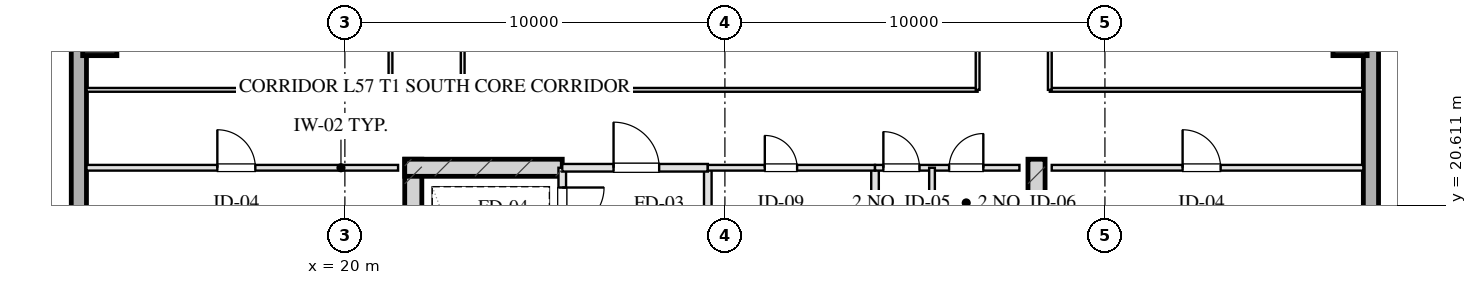
"""IFC4 building model, lengths in metres.
Left out: names, types, materials, properties, quantities, classifications, styles, units other than length and angle.
Written with IfcOpenShell. Run it as: python <this file> out.ifc"""

import sys

from ifc_helpers import new_model, si_unit, direction, frame, frame_2d, origin, origin_2d, place, context, subcontext, project, spatial, rectangle, hollow_rectangle, extrude, element, fill, save


model = new_model("IFC4")
c1 = context("Model", 3, precision=1e-05, world=origin(), true_north=direction((0.0, 1.0)))
c2 = subcontext(c1, "Body", "Model", "MODEL_VIEW")
j1 = project(units=[si_unit("LENGTHUNIT", "METRE"), si_unit("PLANEANGLEUNIT", "RADIAN")], contexts=[c1])
p1 = place(None, origin())
s1 = spatial("IfcSite", under=j1, at=p1, CompositionType="ELEMENT")
p2 = place(p1, origin())
s2 = spatial("IfcBuilding", under=s1, at=p2, CompositionType="ELEMENT")
p3 = place(p2, frame((0.0, 0.0, 212.75)))
s3 = spatial("IfcBuildingStorey", under=s2, at=p3, CompositionType="ELEMENT", Elevation=212.75)
for number, where, z_axis, x_axis in (
    (1, (21.8, 21.825, 0.0), (0.0, 0.0, 1.0), (0.0, -1.0, 0.0)),
    (2, (38.2, 21.825, 0.0), (0.0, 0.0, 1.0), (0.0, -1.0, 0.0)),
):
    element("IfcWall", number, at=place(p3, frame(where, z_axis=z_axis, x_axis=x_axis)), inside=s3, PredefinedType="SHEAR", context=c2, shape_type="SweptSolid", body=[
        extrude(rectangle(XDim=9.33, YDim=0.45, at=frame_2d((4.665, 0.0))), origin(), (0.0, 0.0, 1.0), 3.45),
    ])
p4 = place(p3, frame((21.575, 21.6, 0.0), z_axis=(0.0, 0.0, 1.0), x_axis=(1.0, 0.0, 0.0)))
e3 = element("IfcWall", 3, at=p4, inside=s3, PredefinedType="SHEAR", context=c2, shape_type="SweptSolid", body=[
    extrude(rectangle(XDim=4.145, YDim=0.45, at=frame_2d((2.073, 0.0))), origin(), (0.0, 0.0, 1.0), 3.45),
])
for number, where, z_axis, x_axis in (
    (4, (13.55, 25.0, 0.0), (0.0, 0.0, 1.0), (1.0, 0.0, 0.0)),
    (5, (46.45, 25.0, 0.0), (0.0, 0.0, 1.0), (1.0, 0.0, 0.0)),
):
    element("IfcColumn", number, at=place(p3, frame(where, z_axis=z_axis, x_axis=x_axis)), inside=s3, PredefinedType="COLUMN", context=c2, shape_type="SweptSolid", body=[
        extrude(hollow_rectangle(XDim=0.9, YDim=0.9, WallThickness=0.032, at=origin_2d()), origin(), (0.0, 0.0, 1.0), 3.451),
    ])
p5 = place(p3, frame((13.0, 10.8, 0.0), z_axis=(0.0, 0.0, 1.0), x_axis=(0.0, 1.0, 0.0)))
e6 = element("IfcWall", 6, at=p5, inside=s3, PredefinedType="SOLIDWALL", context=c2, shape_type="SweptSolid", body=[
    extrude(rectangle(XDim=46.4, YDim=0.4, at=frame_2d((23.2, 0.0))), origin(), (0.0, 0.0, 1.0), 2.55),
])
p6 = place(p5, frame((15.75, 0.0, 0.75)))
e7 = element("IfcOpeningElement", 7, at=p6, cuts=e6, PredefinedType="OPENING", context=c2, shape_type="SweptSolid", body=[
    extrude(rectangle(XDim=2.1, YDim=1.4, at=frame_2d((1.05, 0.7))), frame((0.0, 0.21, 0.0), z_axis=(0.0, -1.0, 0.0), x_axis=(1.0, 0.0, 0.0)), (0.0, 0.0, 1.0), 0.42),
])
p7 = place(p5, frame((19.55, 0.0, 0.75)))
e8 = element("IfcOpeningElement", 8, at=p7, cuts=e6, PredefinedType="OPENING", context=c2, shape_type="SweptSolid", body=[
    extrude(rectangle(XDim=2.1, YDim=1.4, at=frame_2d((1.05, 0.7))), frame((0.0, 0.21, 0.0), z_axis=(0.0, -1.0, 0.0), x_axis=(1.0, 0.0, 0.0)), (0.0, 0.0, 1.0), 0.42),
])
p8 = place(p5, frame((24.75, 0.0, 0.75)))
e9 = element("IfcOpeningElement", 9, at=p8, cuts=e6, PredefinedType="OPENING", context=c2, shape_type="SweptSolid", body=[
    extrude(rectangle(XDim=2.1, YDim=1.4, at=frame_2d((1.05, 0.7))), frame((0.0, 0.21, 0.0), z_axis=(0.0, -1.0, 0.0), x_axis=(1.0, 0.0, 0.0)), (0.0, 0.0, 1.0), 0.42),
])
p9 = place(p5, frame((28.55, 0.0, 0.75)))
e10 = element("IfcOpeningElement", 10, at=p9, cuts=e6, PredefinedType="OPENING", context=c2, shape_type="SweptSolid", body=[
    extrude(rectangle(XDim=2.1, YDim=1.4, at=frame_2d((1.05, 0.7))), frame((0.0, 0.21, 0.0), z_axis=(0.0, -1.0, 0.0), x_axis=(1.0, 0.0, 0.0)), (0.0, 0.0, 1.0), 0.42),
])
p10 = place(p3, frame((47.0, 57.2, 0.0), z_axis=(0.0, 0.0, 1.0), x_axis=(0.0, -1.0, 0.0)))
e11 = element("IfcWall", 11, at=p10, inside=s3, PredefinedType="SOLIDWALL", context=c2, shape_type="SweptSolid", body=[
    extrude(rectangle(XDim=46.4, YDim=0.4, at=frame_2d((23.2, 0.0))), origin(), (0.0, 0.0, 1.0), 2.55),
])
p11 = place(p10, frame((28.55, 0.0, 0.75)))
e12 = element("IfcOpeningElement", 12, at=p11, cuts=e11, PredefinedType="OPENING", context=c2, shape_type="SweptSolid", body=[
    extrude(rectangle(XDim=2.1, YDim=1.4, at=frame_2d((1.05, 0.7))), frame((0.0, 0.21, 0.0), z_axis=(0.0, -1.0, 0.0), x_axis=(1.0, 0.0, 0.0)), (0.0, 0.0, 1.0), 0.42),
])
p12 = place(p10, frame((24.75, 0.0, 0.75)))
e13 = element("IfcOpeningElement", 13, at=p12, cuts=e11, PredefinedType="OPENING", context=c2, shape_type="SweptSolid", body=[
    extrude(rectangle(XDim=2.1, YDim=1.4, at=frame_2d((1.05, 0.7))), frame((0.0, 0.21, 0.0), z_axis=(0.0, -1.0, 0.0), x_axis=(1.0, 0.0, 0.0)), (0.0, 0.0, 1.0), 0.42),
])
p13 = place(p10, frame((19.55, 0.0, 0.75)))
e14 = element("IfcOpeningElement", 14, at=p13, cuts=e11, PredefinedType="OPENING", context=c2, shape_type="SweptSolid", body=[
    extrude(rectangle(XDim=2.1, YDim=1.4, at=frame_2d((1.05, 0.7))), frame((0.0, 0.21, 0.0), z_axis=(0.0, -1.0, 0.0), x_axis=(1.0, 0.0, 0.0)), (0.0, 0.0, 1.0), 0.42),
])
p14 = place(p10, frame((15.75, 0.0, 0.75)))
e15 = element("IfcOpeningElement", 15, at=p14, cuts=e11, PredefinedType="OPENING", context=c2, shape_type="SweptSolid", body=[
    extrude(rectangle(XDim=2.1, YDim=1.4, at=frame_2d((1.05, 0.7))), frame((0.0, 0.21, 0.0), z_axis=(0.0, -1.0, 0.0), x_axis=(1.0, 0.0, 0.0)), (0.0, 0.0, 1.0), 0.42),
])
p15 = place(p3, frame((25.72, 21.6, 0.0), z_axis=(0.0, 0.0, 1.0), x_axis=(0.0, -1.0, 0.0)))
e16 = element("IfcWall", 16, at=p15, inside=s3, PredefinedType="PARTITIONING", context=c2, shape_type="SweptSolid", body=[
    extrude(rectangle(XDim=1.9, YDim=0.2, at=frame_2d((0.95, 0.0))), origin(), (0.0, 0.0, 1.0), 3.155),
])
p16 = place(p15, frame((0.52, 0.0, 0.0)))
e17 = element("IfcOpeningElement", 17, at=p16, cuts=e16, PredefinedType="OPENING", context=c2, shape_type="SweptSolid", body=[
    extrude(rectangle(XDim=1.1, YDim=2.05, at=frame_2d((0.55, 1.025))), frame((0.0, 0.11, 0.0), z_axis=(0.0, -1.0, 0.0), x_axis=(1.0, 0.0, 0.0)), (0.0, 0.0, 1.0), 0.22),
])
p17 = place(p3, frame((29.55, 21.6, 0.0), z_axis=(0.0, 0.0, 1.0), x_axis=(0.0, -1.0, 0.0)))
e18 = element("IfcWall", 18, at=p17, inside=s3, PredefinedType="PARTITIONING", context=c2, shape_type="SweptSolid", body=[
    extrude(rectangle(XDim=8.43, YDim=0.2, at=frame_2d((4.215, 0.0))), origin(), (0.0, 0.0, 1.0), 3.155),
])
p18 = place(p3, frame((25.72, 21.6, 0.0), z_axis=(0.0, 0.0, 1.0), x_axis=(1.0, 0.0, 0.0)))
e19 = element("IfcWall", 19, at=p18, inside=s3, PredefinedType="PARTITIONING", context=c2, shape_type="SweptSolid", body=[
    extrude(rectangle(XDim=3.83, YDim=0.2, at=frame_2d((1.915, 0.0))), origin(), (0.0, 0.0, 1.0), 3.155),
])
p19 = place(p18, frame((1.35, 0.0, 0.0)))
e20 = element("IfcOpeningElement", 20, at=p19, cuts=e19, PredefinedType="OPENING", context=c2, shape_type="SweptSolid", body=[
    extrude(rectangle(XDim=1.2, YDim=2.05, at=frame_2d((0.6, 1.025))), frame((0.0, 0.11, 0.0), z_axis=(0.0, -1.0, 0.0), x_axis=(1.0, 0.0, 0.0)), (0.0, 0.0, 1.0), 0.22),
])
p20 = place(p3, frame((33.95, 21.6, 0.0), z_axis=(0.0, 0.0, 1.0), x_axis=(0.0, -1.0, 0.0)))
e21 = element("IfcWall", 21, at=p20, inside=s3, PredefinedType="PARTITIONING", context=c2, shape_type="SweptSolid", body=[
    extrude(rectangle(XDim=8.43, YDim=0.2, at=frame_2d((4.215, 0.0))), origin(), (0.0, 0.0, 1.0), 3.155),
])
p21 = place(p3, frame((29.55, 21.6, 0.0), z_axis=(0.0, 0.0, 1.0), x_axis=(1.0, 0.0, 0.0)))
e22 = element("IfcWall", 22, at=p21, inside=s3, PredefinedType="PARTITIONING", context=c2, shape_type="SweptSolid", body=[
    extrude(rectangle(XDim=4.4, YDim=0.15, at=frame_2d((2.2, 0.0))), origin(), (0.0, 0.0, 1.0), 3.155),
])
p22 = place(p21, frame((1.5, 0.0, 0.0)))
e23 = element("IfcOpeningElement", 23, at=p22, cuts=e22, PredefinedType="OPENING", context=c2, shape_type="SweptSolid", body=[
    extrude(rectangle(XDim=0.85, YDim=2.05, at=frame_2d((0.425, 1.025))), frame((0.0, 0.085, 0.0), z_axis=(0.0, -1.0, 0.0), x_axis=(1.0, 0.0, 0.0)), (0.0, 0.0, 1.0), 0.17),
])
p23 = place(p3, frame((33.95, 21.6, 0.0), z_axis=(0.0, 0.0, 1.0), x_axis=(1.0, 0.0, 0.0)))
e24 = element("IfcWall", 24, at=p23, inside=s3, PredefinedType="PARTITIONING", context=c2, shape_type="SweptSolid", body=[
    extrude(rectangle(XDim=3.8, YDim=0.15, at=frame_2d((1.9, 0.0))), origin(), (0.0, 0.0, 1.0), 3.155),
])
p24 = place(p23, frame((0.22, 0.0, 0.0)))
e25 = element("IfcOpeningElement", 25, at=p24, cuts=e24, PredefinedType="OPENING", context=c2, shape_type="SweptSolid", body=[
    extrude(rectangle(XDim=0.95, YDim=2.05, at=frame_2d((0.475, 1.025))), frame((0.0, 0.085, 0.0), z_axis=(0.0, -1.0, 0.0), x_axis=(1.0, 0.0, 0.0)), (0.0, 0.0, 1.0), 0.17),
])
p25 = place(p23, frame((1.95, 0.0, 0.0)))
e26 = element("IfcOpeningElement", 26, at=p25, cuts=e24, PredefinedType="OPENING", context=c2, shape_type="SweptSolid", body=[
    extrude(rectangle(XDim=0.9, YDim=2.05, at=frame_2d((0.45, 1.025))), frame((0.0, 0.085, 0.0), z_axis=(0.0, -1.0, 0.0), x_axis=(1.0, 0.0, 0.0)), (0.0, 0.0, 1.0), 0.17),
])
p26 = place(p3, frame((35.45, 21.6, 0.0), z_axis=(0.0, 0.0, 1.0), x_axis=(0.0, -1.0, 0.0)))
e27 = element("IfcWall", 27, at=p26, inside=s3, PredefinedType="PARTITIONING", context=c2, shape_type="SweptSolid", body=[
    extrude(rectangle(XDim=8.43, YDim=0.15, at=frame_2d((4.215, 0.0))), origin(), (0.0, 0.0, 1.0), 2.795),
])
p27 = place(p26, frame((2.55, 0.0, 0.0)))
e28 = element("IfcOpeningElement", 28, at=p27, cuts=e27, PredefinedType="OPENING", context=c2, shape_type="SweptSolid", body=[
    extrude(rectangle(XDim=0.95, YDim=2.05, at=frame_2d((0.475, 1.025))), frame((0.0, 0.085, 0.0), z_axis=(0.0, -1.0, 0.0), x_axis=(1.0, 0.0, 0.0)), (0.0, 0.0, 1.0), 0.17),
])
p28 = place(p26, frame((5.6, 0.0, 0.0)))
e29 = element("IfcOpeningElement", 29, at=p28, cuts=e27, PredefinedType="OPENING", context=c2, shape_type="SweptSolid", body=[
    extrude(rectangle(XDim=0.9, YDim=2.05, at=frame_2d((0.45, 1.025))), frame((0.0, 0.085, 0.0), z_axis=(0.0, -1.0, 0.0), x_axis=(1.0, 0.0, 0.0)), (0.0, 0.0, 1.0), 0.17),
])
p29 = place(p3, frame((13.2, 21.6, 0.0), z_axis=(0.0, 0.0, 1.0), x_axis=(1.0, 0.0, 0.0)))
e30 = element("IfcWall", 30, at=p29, inside=s3, PredefinedType="PARTITIONING", context=c2, shape_type="SweptSolid", body=[
    extrude(rectangle(XDim=8.2, YDim=0.15, at=frame_2d((4.1, 0.0))), origin(), (0.0, 0.0, 1.0), 3.155),
])
p30 = place(p29, frame((3.444, 0.0, 0.0)))
e31 = element("IfcOpeningElement", 31, at=p30, cuts=e30, PredefinedType="OPENING", context=c2, shape_type="SweptSolid", body=[
    extrude(rectangle(XDim=1.0, YDim=2.05, at=frame_2d((0.5, 1.025))), frame((0.0, 0.085, 0.0), z_axis=(0.0, -1.0, 0.0), x_axis=(1.0, 0.0, 0.0)), (0.0, 0.0, 1.0), 0.17),
])
p31 = place(p3, frame((38.6, 21.6, 0.0), z_axis=(0.0, 0.0, 1.0), x_axis=(1.0, 0.0, 0.0)))
e32 = element("IfcWall", 32, at=p31, inside=s3, PredefinedType="PARTITIONING", context=c2, shape_type="SweptSolid", body=[
    extrude(rectangle(XDim=8.2, YDim=0.15, at=frame_2d((4.1, 0.0))), origin(), (0.0, 0.0, 1.0), 3.155),
])
p32 = place(p31, frame((3.444, 0.0, 0.0)))
e33 = element("IfcOpeningElement", 33, at=p32, cuts=e32, PredefinedType="OPENING", context=c2, shape_type="SweptSolid", body=[
    extrude(rectangle(XDim=1.0, YDim=2.05, at=frame_2d((0.5, 1.025))), frame((0.0, 0.085, 0.0), z_axis=(0.0, -1.0, 0.0), x_axis=(1.0, 0.0, 0.0)), (0.0, 0.0, 1.0), 0.17),
])
p33 = place(p3, frame((13.2, 23.65, 0.0), z_axis=(0.0, 0.0, 1.0), x_axis=(1.0, 0.0, 0.0)))
e34 = element("IfcWall", 34, at=p33, inside=s3, PredefinedType="MOVABLE", context=c2, shape_type="SweptSolid", body=[
    extrude(rectangle(XDim=8.0, YDim=0.1, at=frame_2d((4.0, 0.0))), origin(), (0.0, 0.0, 1.0), 3.155),
])
p34 = place(p3, frame((23.1, 23.65, 0.0), z_axis=(0.0, 0.0, 1.0), x_axis=(1.0, 0.0, 0.0)))
e35 = element("IfcWall", 35, at=p34, inside=s3, PredefinedType="MOVABLE", context=c2, shape_type="SweptSolid", body=[
    extrude(rectangle(XDim=13.55, YDim=0.1, at=frame_2d((6.775, 0.0))), origin(), (0.0, 0.0, 1.0), 3.155),
])
p35 = place(p3, frame((38.55, 23.65, 0.0), z_axis=(0.0, 0.0, 1.0), x_axis=(1.0, 0.0, 0.0)))
e36 = element("IfcWall", 36, at=p35, inside=s3, PredefinedType="MOVABLE", context=c2, shape_type="SweptSolid", body=[
    extrude(rectangle(XDim=8.25, YDim=0.1, at=frame_2d((4.125, 0.0))), origin(), (0.0, 0.0, 1.0), 3.155),
])
p36 = place(p3, frame((21.2, 23.65, 0.0), z_axis=(0.0, 0.0, 1.0), x_axis=(0.0, 1.0, 0.0)))
e37 = element("IfcWall", 37, at=p36, inside=s3, PredefinedType="MOVABLE", context=c2, shape_type="SweptSolid", body=[
    extrude(rectangle(XDim=20.7, YDim=0.1, at=frame_2d((10.35, 0.0))), origin(), (0.0, 0.0, 1.0), 3.155),
])
p37 = place(p36, frame((2.175, 0.0, 0.0)))
e38 = element("IfcOpeningElement", 38, at=p37, cuts=e37, PredefinedType="OPENING", context=c2, shape_type="SweptSolid", body=[
    extrude(rectangle(XDim=1.0, YDim=2.05, at=frame_2d((0.5, 1.025))), frame((0.0, 0.06, 0.0), z_axis=(0.0, -1.0, 0.0), x_axis=(1.0, 0.0, 0.0)), (0.0, 0.0, 1.0), 0.12),
])
p38 = place(p36, frame((6.75, 0.0, 0.0)))
e39 = element("IfcOpeningElement", 39, at=p38, cuts=e37, PredefinedType="OPENING", context=c2, shape_type="SweptSolid", body=[
    extrude(rectangle(XDim=1.0, YDim=2.05, at=frame_2d((0.5, 1.025))), frame((0.0, 0.06, 0.0), z_axis=(0.0, -1.0, 0.0), x_axis=(1.0, 0.0, 0.0)), (0.0, 0.0, 1.0), 0.12),
])
p39 = place(p36, frame((9.85, 0.0, 0.0)))
e40 = element("IfcOpeningElement", 40, at=p39, cuts=e37, PredefinedType="OPENING", context=c2, shape_type="SweptSolid", body=[
    extrude(rectangle(XDim=1.05, YDim=2.05, at=frame_2d((0.525, 1.025))), frame((0.0, 0.06, 0.0), z_axis=(0.0, -1.0, 0.0), x_axis=(1.0, 0.0, 0.0)), (0.0, 0.0, 1.0), 0.12),
])
p40 = place(p36, frame((12.95, 0.0, 0.0)))
e41 = element("IfcOpeningElement", 41, at=p40, cuts=e37, PredefinedType="OPENING", context=c2, shape_type="SweptSolid", body=[
    extrude(rectangle(XDim=1.0, YDim=2.05, at=frame_2d((0.5, 1.025))), frame((0.0, 0.06, 0.0), z_axis=(0.0, -1.0, 0.0), x_axis=(1.0, 0.0, 0.0)), (0.0, 0.0, 1.0), 0.12),
])
p41 = place(p36, frame((17.525, 0.0, 0.0)))
e42 = element("IfcOpeningElement", 42, at=p41, cuts=e37, PredefinedType="OPENING", context=c2, shape_type="SweptSolid", body=[
    extrude(rectangle(XDim=1.0, YDim=2.05, at=frame_2d((0.5, 1.025))), frame((0.0, 0.06, 0.0), z_axis=(0.0, -1.0, 0.0), x_axis=(1.0, 0.0, 0.0)), (0.0, 0.0, 1.0), 0.12),
])
p42 = place(p3, frame((23.1, 23.65, 0.0), z_axis=(0.0, 0.0, 1.0), x_axis=(0.0, 1.0, 0.0)))
e43 = element("IfcWall", 43, at=p42, inside=s3, PredefinedType="MOVABLE", context=c2, shape_type="SweptSolid", body=[
    extrude(rectangle(XDim=20.7, YDim=0.1, at=frame_2d((10.35, 0.0))), origin(), (0.0, 0.0, 1.0), 3.155),
])
p43 = place(p42, frame((2.857, 0.0, 0.0)))
e44 = element("IfcOpeningElement", 44, at=p43, cuts=e43, PredefinedType="OPENING", context=c2, shape_type="SweptSolid", body=[
    extrude(rectangle(XDim=1.1, YDim=2.05, at=frame_2d((0.55, 1.025))), frame((0.0, 0.06, 0.0), z_axis=(0.0, -1.0, 0.0), x_axis=(1.0, 0.0, 0.0)), (0.0, 0.0, 1.0), 0.12),
])
p44 = place(p42, frame((17.208, 0.0, 0.0)))
e45 = element("IfcOpeningElement", 45, at=p44, cuts=e43, PredefinedType="OPENING", context=c2, shape_type="SweptSolid", body=[
    extrude(rectangle(XDim=1.1, YDim=2.05, at=frame_2d((0.55, 1.025))), frame((0.0, 0.06, 0.0), z_axis=(0.0, -1.0, 0.0), x_axis=(1.0, 0.0, 0.0)), (0.0, 0.0, 1.0), 0.12),
])
p45 = place(p3, frame((36.65, 23.65, 0.0), z_axis=(0.0, 0.0, 1.0), x_axis=(0.0, 1.0, 0.0)))
e46 = element("IfcWall", 46, at=p45, inside=s3, PredefinedType="MOVABLE", context=c2, shape_type="SweptSolid", body=[
    extrude(rectangle(XDim=20.7, YDim=0.1, at=frame_2d((10.35, 0.0))), origin(), (0.0, 0.0, 1.0), 3.155),
])
p46 = place(p45, frame((9.71, 0.0, 0.0)))
e47 = element("IfcOpeningElement", 47, at=p46, cuts=e46, PredefinedType="OPENING", context=c2, shape_type="SweptSolid", body=[
    extrude(rectangle(XDim=1.1, YDim=2.05, at=frame_2d((0.55, 1.025))), frame((0.0, 0.06, 0.0), z_axis=(0.0, -1.0, 0.0), x_axis=(1.0, 0.0, 0.0)), (0.0, 0.0, 1.0), 0.12),
])
p47 = place(p3, frame((38.55, 23.65, 0.0), z_axis=(0.0, 0.0, 1.0), x_axis=(0.0, 1.0, 0.0)))
e48 = element("IfcWall", 48, at=p47, inside=s3, PredefinedType="MOVABLE", context=c2, shape_type="SweptSolid", body=[
    extrude(rectangle(XDim=20.7, YDim=0.1, at=frame_2d((10.35, 0.0))), origin(), (0.0, 0.0, 1.0), 3.155),
])
p48 = place(p47, frame((2.675, 0.0, 0.0)))
e49 = element("IfcOpeningElement", 49, at=p48, cuts=e48, PredefinedType="OPENING", context=c2, shape_type="SweptSolid", body=[
    extrude(rectangle(XDim=1.0, YDim=2.05, at=frame_2d((0.5, 1.025))), frame((0.0, 0.06, 0.0), z_axis=(0.0, -1.0, 0.0), x_axis=(1.0, 0.0, 0.0)), (0.0, 0.0, 1.0), 0.12),
])
p49 = place(p47, frame((9.85, 0.0, 0.0)))
e50 = element("IfcOpeningElement", 50, at=p49, cuts=e48, PredefinedType="OPENING", context=c2, shape_type="SweptSolid", body=[
    extrude(rectangle(XDim=1.05, YDim=2.05, at=frame_2d((0.525, 1.025))), frame((0.0, 0.06, 0.0), z_axis=(0.0, -1.0, 0.0), x_axis=(1.0, 0.0, 0.0)), (0.0, 0.0, 1.0), 0.12),
])
p50 = place(p47, frame((17.025, 0.0, 0.0)))
e51 = element("IfcOpeningElement", 51, at=p50, cuts=e48, PredefinedType="OPENING", context=c2, shape_type="SweptSolid", body=[
    extrude(rectangle(XDim=1.0, YDim=2.05, at=frame_2d((0.5, 1.025))), frame((0.0, 0.06, 0.0), z_axis=(0.0, -1.0, 0.0), x_axis=(1.0, 0.0, 0.0)), (0.0, 0.0, 1.0), 0.12),
])
p51 = place(p16, origin())
e52 = element("IfcDoor", 52, at=p51, inside=s3, OperationType="SINGLE_SWING_LEFT", PredefinedType="DOOR", context=c2, shape_type="SweptSolid", body=[
    extrude(rectangle(XDim=1.1, YDim=2.05, at=frame_2d((0.55, 1.025))), frame((0.0, 0.025, 0.0), z_axis=(0.0, -1.0, 0.0), x_axis=(1.0, 0.0, 0.0)), (0.0, 0.0, 1.0), 0.05),
])
fill(e17, e52)
p52 = place(p19, origin())
e53 = element("IfcDoor", 53, at=p52, inside=s3, OperationType="SINGLE_SWING_LEFT", PredefinedType="DOOR", context=c2, shape_type="SweptSolid", body=[
    extrude(rectangle(XDim=1.2, YDim=2.05, at=frame_2d((0.6, 1.025))), frame((0.0, 0.025, 0.0), z_axis=(0.0, -1.0, 0.0), x_axis=(1.0, 0.0, 0.0)), (0.0, 0.0, 1.0), 0.05),
])
fill(e20, e53)
p53 = place(p22, origin())
e54 = element("IfcDoor", 54, at=p53, inside=s3, OperationType="SINGLE_SWING_LEFT", PredefinedType="DOOR", context=c2, shape_type="SweptSolid", body=[
    extrude(rectangle(XDim=0.85, YDim=2.05, at=frame_2d((0.425, 1.025))), frame((0.0, 0.025, 0.0), z_axis=(0.0, -1.0, 0.0), x_axis=(1.0, 0.0, 0.0)), (0.0, 0.0, 1.0), 0.05),
])
fill(e23, e54)
p54 = place(p24, origin())
e55 = element("IfcDoor", 55, at=p54, inside=s3, OperationType="SINGLE_SWING_LEFT", PredefinedType="DOOR", context=c2, shape_type="SweptSolid", body=[
    extrude(rectangle(XDim=0.95, YDim=2.05, at=frame_2d((0.475, 1.025))), frame((0.0, 0.025, 0.0), z_axis=(0.0, -1.0, 0.0), x_axis=(1.0, 0.0, 0.0)), (0.0, 0.0, 1.0), 0.05),
])
fill(e25, e55)
p55 = place(p25, origin())
e56 = element("IfcDoor", 56, at=p55, inside=s3, OperationType="SINGLE_SWING_RIGHT", PredefinedType="DOOR", context=c2, shape_type="SweptSolid", body=[
    extrude(rectangle(XDim=0.9, YDim=2.05, at=frame_2d((0.45, 1.025))), frame((0.0, 0.025, 0.0), z_axis=(0.0, -1.0, 0.0), x_axis=(1.0, 0.0, 0.0)), (0.0, 0.0, 1.0), 0.05),
])
fill(e26, e56)
p56 = place(p30, origin())
e57 = element("IfcDoor", 57, at=p56, inside=s3, OperationType="SINGLE_SWING_LEFT", PredefinedType="DOOR", context=c2, shape_type="SweptSolid", body=[
    extrude(rectangle(XDim=1.0, YDim=2.05, at=frame_2d((0.5, 1.025))), frame((0.0, 0.025, 0.0), z_axis=(0.0, -1.0, 0.0), x_axis=(1.0, 0.0, 0.0)), (0.0, 0.0, 1.0), 0.05),
])
fill(e31, e57)
p57 = place(p32, origin())
e58 = element("IfcDoor", 58, at=p57, inside=s3, OperationType="SINGLE_SWING_LEFT", PredefinedType="DOOR", context=c2, shape_type="SweptSolid", body=[
    extrude(rectangle(XDim=1.0, YDim=2.05, at=frame_2d((0.5, 1.025))), frame((0.0, 0.025, 0.0), z_axis=(0.0, -1.0, 0.0), x_axis=(1.0, 0.0, 0.0)), (0.0, 0.0, 1.0), 0.05),
])
fill(e33, e58)
save(model, sys.argv[1])
